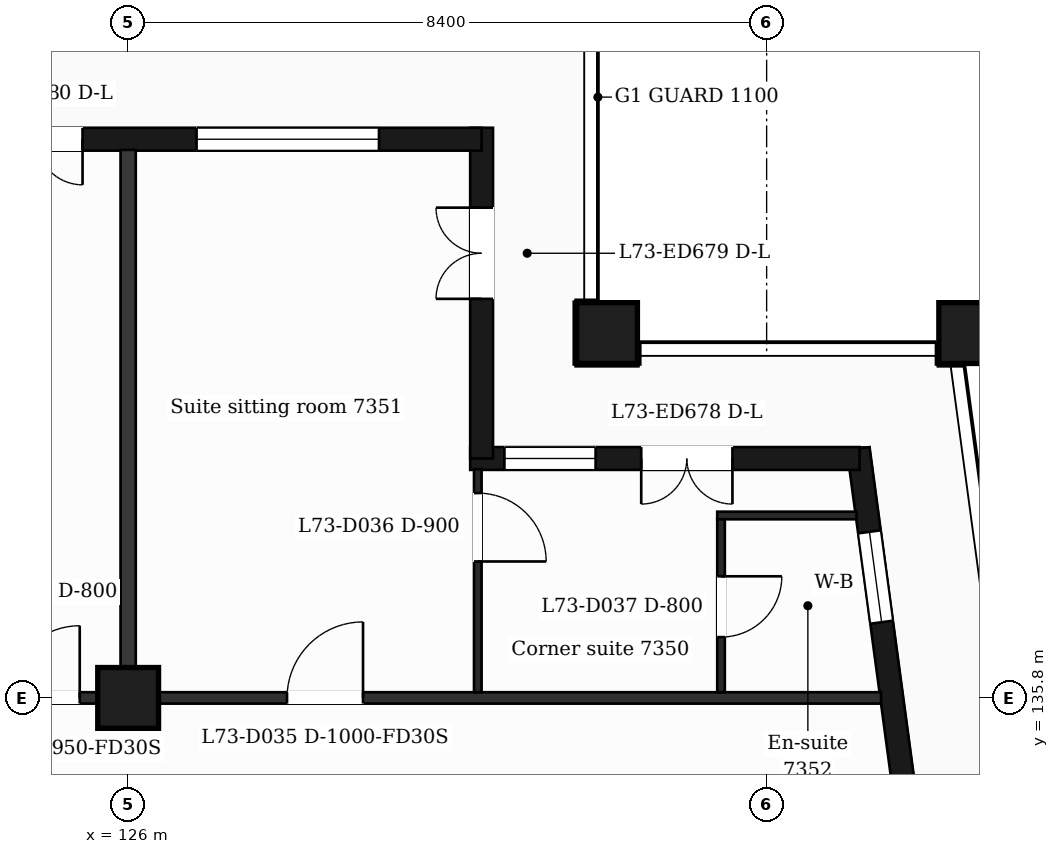
"""IFC4 building model, lengths in metres.
Left out: names, types, materials, properties, quantities, classifications, styles, units other than length and angle.
Written with IfcOpenShell. Run it as: python <this file> out.ifc"""

import sys

from ifc_helpers import new_model, si_unit, direction, frame, frame_2d, origin, origin_2d, place, context, subcontext, project, spatial, rectangle, extrude, element, fill, save


model = new_model("IFC4")
c1 = context("Model", 3, precision=1e-05, world=origin(), true_north=direction((0.0, 1.0)))
c2 = subcontext(c1, "Body", "Model", "MODEL_VIEW")
j1 = project(units=[si_unit("LENGTHUNIT", "METRE"), si_unit("PLANEANGLEUNIT", "RADIAN")], contexts=[c1])
p1 = place(None, origin())
s1 = spatial("IfcSite", under=j1, at=p1, CompositionType="ELEMENT")
p2 = place(p1, origin())
s2 = spatial("IfcBuilding", under=s1, at=p2, CompositionType="ELEMENT")
p3 = place(p2, frame((0.0, 0.0, 299.7)))
s3 = spatial("IfcBuildingStorey", under=s2, at=p3, CompositionType="ELEMENT", Elevation=299.7)
for number, where, z_axis, x_axis in (
    (1, (132.3, 140.6, 0.0), (0.0, 0.0, 1.0), (1.0, 0.0, 0.0)),
    (2, (137.065, 140.6, 0.0), (0.0, 0.0, 1.0), (1.0, 0.0, 0.0)),
    (3, (126.0, 135.8, 0.0), (0.0, 0.0, 1.0), (1.0, 0.0, 0.0)),
):
    element("IfcColumn", number, at=place(p3, frame(where, z_axis=z_axis, x_axis=x_axis)), inside=s3, PredefinedType="COLUMN", context=c2, shape_type="SweptSolid", body=[
        extrude(rectangle(XDim=0.8, YDim=0.8, at=origin_2d()), origin(), (0.0, 0.0, 1.0), 3.7),
    ])
p4 = place(p3, frame((136.504, 132.4, 0.0), z_axis=(0.0, 0.0, 1.0), x_axis=(-0.133399697462, 0.99106231929, 0.0)))
e4 = element("IfcWall", 4, at=p4, inside=s3, PredefinedType="SOLIDWALL", context=c2, shape_type="SweptSolid", body=[
    extrude(rectangle(XDim=6.74, YDim=0.3, at=frame_2d((3.37, 0.0))), origin(), (0.0, 0.0, 1.0), 3.25),
])
p5 = place(p4, frame((1.115, 0.0, 0.0)))
e5 = element("IfcOpeningElement", 5, at=p5, cuts=e4, PredefinedType="OPENING", context=c2, shape_type="SweptSolid", body=[
    extrude(rectangle(XDim=1.2, YDim=2.4, at=frame_2d((0.6, 1.2))), frame((0.0, 0.16, 0.0), z_axis=(0.0, -1.0, 0.0), x_axis=(1.0, 0.0, 0.0)), (0.0, 0.0, 1.0), 0.32),
])
p6 = place(p4, frame((4.436, 0.0, 0.9)))
e6 = element("IfcOpeningElement", 6, at=p6, cuts=e4, PredefinedType="OPENING", context=c2, shape_type="SweptSolid", body=[
    extrude(rectangle(XDim=1.2, YDim=2.1, at=frame_2d((0.6, 1.05))), frame((0.0, 0.16, 0.0), z_axis=(0.0, -1.0, 0.0), x_axis=(1.0, 0.0, 0.0)), (0.0, 0.0, 1.0), 0.32),
])
p7 = place(p3, frame((135.623, 138.95, 0.0), z_axis=(0.0, 0.0, 1.0), x_axis=(-1.0, 0.0, 0.0)))
e7 = element("IfcWall", 7, at=p7, inside=s3, PredefinedType="SOLIDWALL", context=c2, shape_type="SweptSolid", body=[
    extrude(rectangle(XDim=5.123, YDim=0.3, at=frame_2d((2.561, 0.0))), origin(), (0.0, 0.0, 1.0), 3.25),
])
p8 = place(p7, frame((1.673, 0.0, 0.0)))
e8 = element("IfcOpeningElement", 8, at=p8, cuts=e7, PredefinedType="OPENING", context=c2, shape_type="SweptSolid", body=[
    extrude(rectangle(XDim=1.2, YDim=2.4, at=frame_2d((0.6, 1.2))), frame((0.0, 0.16, 0.0), z_axis=(0.0, -1.0, 0.0), x_axis=(1.0, 0.0, 0.0)), (0.0, 0.0, 1.0), 0.32),
])
p9 = place(p7, frame((3.473, 0.0, 0.9)))
e9 = element("IfcOpeningElement", 9, at=p9, cuts=e7, PredefinedType="OPENING", context=c2, shape_type="SweptSolid", body=[
    extrude(rectangle(XDim=1.2, YDim=2.1, at=frame_2d((0.6, 1.05))), frame((0.0, 0.16, 0.0), z_axis=(0.0, -1.0, 0.0), x_axis=(1.0, 0.0, 0.0)), (0.0, 0.0, 1.0), 0.32),
])
p10 = place(p3, frame((130.65, 138.95, 0.0), z_axis=(0.0, 0.0, 1.0), x_axis=(0.0, 1.0, 0.0)))
e10 = element("IfcWall", 10, at=p10, inside=s3, PredefinedType="SOLIDWALL", context=c2, shape_type="SweptSolid", body=[
    extrude(rectangle(XDim=4.35, YDim=0.3, at=frame_2d((2.175, 0.0))), origin(), (0.0, 0.0, 1.0), 3.25),
])
p11 = place(p10, frame((2.1, 0.0, 0.0)))
e11 = element("IfcOpeningElement", 11, at=p11, cuts=e10, PredefinedType="OPENING", context=c2, shape_type="SweptSolid", body=[
    extrude(rectangle(XDim=1.2, YDim=2.4, at=frame_2d((0.6, 1.2))), frame((0.0, 0.16, 0.0), z_axis=(0.0, -1.0, 0.0), x_axis=(1.0, 0.0, 0.0)), (0.0, 0.0, 1.0), 0.32),
])
p12 = place(p3, frame((130.65, 143.15, 0.0), z_axis=(0.0, 0.0, 1.0), x_axis=(-1.0, 0.0, 0.0)))
e12 = element("IfcWall", 12, at=p12, inside=s3, PredefinedType="SOLIDWALL", context=c2, shape_type="SweptSolid", body=[
    extrude(rectangle(XDim=14.25, YDim=0.3, at=frame_2d((7.125, 0.0))), origin(), (0.0, 0.0, 1.0), 3.25),
])
p13 = place(p12, frame((1.35, 0.0, 0.9)))
e13 = element("IfcOpeningElement", 13, at=p13, cuts=e12, PredefinedType="OPENING", context=c2, shape_type="SweptSolid", body=[
    extrude(rectangle(XDim=2.4, YDim=2.1, at=frame_2d((1.2, 1.05))), frame((0.0, 0.16, 0.0), z_axis=(0.0, -1.0, 0.0), x_axis=(1.0, 0.0, 0.0)), (0.0, 0.0, 1.0), 0.32),
])
p14 = place(p12, frame((5.25, 0.0, 0.0)))
e14 = element("IfcOpeningElement", 14, at=p14, cuts=e12, PredefinedType="OPENING", context=c2, shape_type="SweptSolid", body=[
    extrude(rectangle(XDim=1.2, YDim=2.4, at=frame_2d((0.6, 1.2))), frame((0.0, 0.16, 0.0), z_axis=(0.0, -1.0, 0.0), x_axis=(1.0, 0.0, 0.0)), (0.0, 0.0, 1.0), 0.32),
])
p15 = place(p12, frame((7.05, 0.0, 0.9)))
e15 = element("IfcOpeningElement", 15, at=p15, cuts=e12, PredefinedType="OPENING", context=c2, shape_type="SweptSolid", body=[
    extrude(rectangle(XDim=1.2, YDim=2.1, at=frame_2d((0.6, 1.05))), frame((0.0, 0.16, 0.0), z_axis=(0.0, -1.0, 0.0), x_axis=(1.0, 0.0, 0.0)), (0.0, 0.0, 1.0), 0.32),
])
p16 = place(p12, frame((10.35, 0.0, 0.9)))
e16 = element("IfcOpeningElement", 16, at=p16, cuts=e12, PredefinedType="OPENING", context=c2, shape_type="SweptSolid", body=[
    extrude(rectangle(XDim=1.2, YDim=2.1, at=frame_2d((0.6, 1.05))), frame((0.0, 0.16, 0.0), z_axis=(0.0, -1.0, 0.0), x_axis=(1.0, 0.0, 0.0)), (0.0, 0.0, 1.0), 0.32),
])
p17 = place(p3, frame((90.895, 135.8, 0.0), z_axis=(0.0, 0.0, 1.0), x_axis=(1.0, 0.0, 0.0)))
e17 = element("IfcWall", 17, at=p17, inside=s3, PredefinedType="PARTITIONING", context=c2, shape_type="SweptSolid", body=[
    extrude(rectangle(XDim=45.011, YDim=0.15, at=frame_2d((22.505, 0.0))), origin(), (0.0, 0.0, 1.0), 3.25),
])
p18 = place(p17, frame((6.906, 0.0, 0.0)))
e18 = element("IfcOpeningElement", 18, at=p18, cuts=e17, PredefinedType="OPENING", context=c2, shape_type="SweptSolid", body=[
    extrude(rectangle(XDim=1.0, YDim=2.1, at=frame_2d((0.5, 1.05))), frame((0.0, 0.085, 0.0), z_axis=(0.0, -1.0, 0.0), x_axis=(1.0, 0.0, 0.0)), (0.0, 0.0, 1.0), 0.17),
])
p19 = place(p17, frame((10.555, 0.0, 0.0)))
e19 = element("IfcOpeningElement", 19, at=p19, cuts=e17, PredefinedType="OPENING", context=c2, shape_type="SweptSolid", body=[
    extrude(rectangle(XDim=1.0, YDim=2.1, at=frame_2d((0.5, 1.05))), frame((0.0, 0.085, 0.0), z_axis=(0.0, -1.0, 0.0), x_axis=(1.0, 0.0, 0.0)), (0.0, 0.0, 1.0), 0.17),
])
p20 = place(p17, frame((16.719, 0.0, 0.0)))
e20 = element("IfcOpeningElement", 20, at=p20, cuts=e17, PredefinedType="OPENING", context=c2, shape_type="SweptSolid", body=[
    extrude(rectangle(XDim=0.95, YDim=2.1, at=frame_2d((0.475, 1.05))), frame((0.0, 0.085, 0.0), z_axis=(0.0, -1.0, 0.0), x_axis=(1.0, 0.0, 0.0)), (0.0, 0.0, 1.0), 0.17),
])
p21 = place(p17, frame((21.281, 0.0, 0.0)))
e21 = element("IfcOpeningElement", 21, at=p21, cuts=e17, PredefinedType="OPENING", context=c2, shape_type="SweptSolid", body=[
    extrude(rectangle(XDim=0.95, YDim=2.1, at=frame_2d((0.475, 1.05))), frame((0.0, 0.085, 0.0), z_axis=(0.0, -1.0, 0.0), x_axis=(1.0, 0.0, 0.0)), (0.0, 0.0, 1.0), 0.17),
])
p22 = place(p17, frame((25.125, 0.0, 0.0)))
e22 = element("IfcOpeningElement", 22, at=p22, cuts=e17, PredefinedType="OPENING", context=c2, shape_type="SweptSolid", body=[
    extrude(rectangle(XDim=0.95, YDim=2.1, at=frame_2d((0.475, 1.05))), frame((0.0, 0.085, 0.0), z_axis=(0.0, -1.0, 0.0), x_axis=(1.0, 0.0, 0.0)), (0.0, 0.0, 1.0), 0.17),
])
p23 = place(p17, frame((27.393, 0.0, 0.0)))
e23 = element("IfcOpeningElement", 23, at=p23, cuts=e17, PredefinedType="OPENING", context=c2, shape_type="SweptSolid", body=[
    extrude(rectangle(XDim=0.95, YDim=2.1, at=frame_2d((0.475, 1.05))), frame((0.0, 0.085, 0.0), z_axis=(0.0, -1.0, 0.0), x_axis=(1.0, 0.0, 0.0)), (0.0, 0.0, 1.0), 0.17),
])
p24 = place(p17, frame((33.518, 0.0, 0.0)))
e24 = element("IfcOpeningElement", 24, at=p24, cuts=e17, PredefinedType="OPENING", context=c2, shape_type="SweptSolid", body=[
    extrude(rectangle(XDim=0.95, YDim=2.1, at=frame_2d((0.475, 1.05))), frame((0.0, 0.085, 0.0), z_axis=(0.0, -1.0, 0.0), x_axis=(1.0, 0.0, 0.0)), (0.0, 0.0, 1.0), 0.17),
])
p25 = place(p17, frame((37.195, 0.0, 0.0)))
e25 = element("IfcOpeningElement", 25, at=p25, cuts=e17, PredefinedType="OPENING", context=c2, shape_type="SweptSolid", body=[
    extrude(rectangle(XDim=1.0, YDim=2.1, at=frame_2d((0.5, 1.05))), frame((0.0, 0.085, 0.0), z_axis=(0.0, -1.0, 0.0), x_axis=(1.0, 0.0, 0.0)), (0.0, 0.0, 1.0), 0.17),
])
p26 = place(p3, frame((133.75, 138.2, 0.0), z_axis=(0.0, 0.0, 1.0), x_axis=(1.0, 0.0, 0.0)))
e26 = element("IfcWall", 26, at=p26, inside=s3, PredefinedType="PARTITIONING", context=c2, shape_type="SweptSolid", body=[
    extrude(rectangle(XDim=1.832, YDim=0.1, at=frame_2d((0.916, 0.0))), origin(), (0.0, 0.0, 1.0), 3.25),
])
p27 = place(p3, frame((126.0, 135.875, 0.0), z_axis=(0.0, 0.0, 1.0), x_axis=(0.0, 1.0, 0.0)))
e27 = element("IfcWall", 27, at=p27, inside=s3, PredefinedType="PARTITIONING", context=c2, shape_type="SweptSolid", body=[
    extrude(rectangle(XDim=7.135, YDim=0.2, at=frame_2d((3.567, 0.0))), origin(), (0.0, 0.0, 1.0), 3.25),
])
p28 = place(p3, frame((130.6, 135.875, 0.0), z_axis=(0.0, 0.0, 1.0), x_axis=(0.0, 1.0, 0.0)))
e28 = element("IfcWall", 28, at=p28, inside=s3, PredefinedType="PARTITIONING", context=c2, shape_type="SweptSolid", body=[
    extrude(rectangle(XDim=2.935, YDim=0.1, at=frame_2d((1.468, 0.0))), origin(), (0.0, 0.0, 1.0), 3.25),
])
p29 = place(p28, frame((1.72, 0.0, 0.0)))
e29 = element("IfcOpeningElement", 29, at=p29, cuts=e28, PredefinedType="OPENING", context=c2, shape_type="SweptSolid", body=[
    extrude(rectangle(XDim=0.9, YDim=2.1, at=frame_2d((0.45, 1.05))), frame((0.0, 0.06, 0.0), z_axis=(0.0, -1.0, 0.0), x_axis=(1.0, 0.0, 0.0)), (0.0, 0.0, 1.0), 0.12),
])
p30 = place(p3, frame((133.8, 135.875, 0.0), z_axis=(0.0, 0.0, 1.0), x_axis=(0.0, 1.0, 0.0)))
e30 = element("IfcWall", 30, at=p30, inside=s3, PredefinedType="PARTITIONING", context=c2, shape_type="SweptSolid", body=[
    extrude(rectangle(XDim=2.275, YDim=0.1, at=frame_2d((1.137, 0.0))), origin(), (0.0, 0.0, 1.0), 3.25),
])
p31 = place(p30, frame((0.725, 0.0, 0.0)))
e31 = element("IfcOpeningElement", 31, at=p31, cuts=e30, PredefinedType="OPENING", context=c2, shape_type="SweptSolid", body=[
    extrude(rectangle(XDim=0.8, YDim=2.1, at=frame_2d((0.4, 1.05))), frame((0.0, 0.06, 0.0), z_axis=(0.0, -1.0, 0.0), x_axis=(1.0, 0.0, 0.0)), (0.0, 0.0, 1.0), 0.12),
])
p32 = place(p6, origin())
e32 = element("IfcWindow", 32, at=p32, inside=s3, PartitioningType="SINGLE_PANEL", PredefinedType="WINDOW", context=c2, shape_type="SweptSolid", body=[
    extrude(rectangle(XDim=1.2, YDim=2.1, at=frame_2d((0.6, 1.05))), frame((0.0, 0.03, 0.0), z_axis=(0.0, -1.0, 0.0), x_axis=(1.0, 0.0, 0.0)), (0.0, 0.0, 1.0), 0.06),
])
fill(e6, e32)
p33 = place(p8, origin())
e33 = element("IfcDoor", 33, at=p33, inside=s3, OperationType="DOUBLE_DOOR_SINGLE_SWING", PredefinedType="DOOR", context=c2, shape_type="SweptSolid", body=[
    extrude(rectangle(XDim=1.2, YDim=2.4, at=frame_2d((0.6, 1.2))), frame((0.0, 0.025, 0.0), z_axis=(0.0, -1.0, 0.0), x_axis=(1.0, 0.0, 0.0)), (0.0, 0.0, 1.0), 0.05),
])
fill(e8, e33)
p34 = place(p9, origin())
e34 = element("IfcWindow", 34, at=p34, inside=s3, PartitioningType="SINGLE_PANEL", PredefinedType="WINDOW", context=c2, shape_type="SweptSolid", body=[
    extrude(rectangle(XDim=1.2, YDim=2.1, at=frame_2d((0.6, 1.05))), frame((0.0, 0.03, 0.0), z_axis=(0.0, -1.0, 0.0), x_axis=(1.0, 0.0, 0.0)), (0.0, 0.0, 1.0), 0.06),
])
fill(e9, e34)
p35 = place(p11, origin())
e35 = element("IfcDoor", 35, at=p35, inside=s3, OperationType="DOUBLE_DOOR_SINGLE_SWING", PredefinedType="DOOR", context=c2, shape_type="SweptSolid", body=[
    extrude(rectangle(XDim=1.2, YDim=2.4, at=frame_2d((0.6, 1.2))), frame((0.0, 0.025, 0.0), z_axis=(0.0, -1.0, 0.0), x_axis=(1.0, 0.0, 0.0)), (0.0, 0.0, 1.0), 0.05),
])
fill(e11, e35)
p36 = place(p13, origin())
e36 = element("IfcWindow", 36, at=p36, inside=s3, PartitioningType="SINGLE_PANEL", PredefinedType="WINDOW", context=c2, shape_type="SweptSolid", body=[
    extrude(rectangle(XDim=2.4, YDim=2.1, at=frame_2d((1.2, 1.05))), frame((0.0, 0.03, 0.0), z_axis=(0.0, -1.0, 0.0), x_axis=(1.0, 0.0, 0.0)), (0.0, 0.0, 1.0), 0.06),
])
fill(e13, e36)
p37 = place(p14, origin())
e37 = element("IfcDoor", 37, at=p37, inside=s3, OperationType="DOUBLE_DOOR_SINGLE_SWING", PredefinedType="DOOR", context=c2, shape_type="SweptSolid", body=[
    extrude(rectangle(XDim=1.2, YDim=2.4, at=frame_2d((0.6, 1.2))), frame((0.0, 0.025, 0.0), z_axis=(0.0, -1.0, 0.0), x_axis=(1.0, 0.0, 0.0)), (0.0, 0.0, 1.0), 0.05),
])
fill(e14, e37)
p38 = place(p24, origin())
e38 = element("IfcDoor", 38, at=p38, inside=s3, OperationType="SINGLE_SWING_RIGHT", PredefinedType="DOOR", context=c2, shape_type="SweptSolid", body=[
    extrude(rectangle(XDim=0.95, YDim=2.1, at=frame_2d((0.475, 1.05))), frame((0.0, 0.025, 0.0), z_axis=(0.0, -1.0, 0.0), x_axis=(1.0, 0.0, 0.0)), (0.0, 0.0, 1.0), 0.05),
])
fill(e24, e38)
p39 = place(p25, origin())
e39 = element("IfcDoor", 39, at=p39, inside=s3, OperationType="SINGLE_SWING_RIGHT", PredefinedType="DOOR", context=c2, shape_type="SweptSolid", body=[
    extrude(rectangle(XDim=1.0, YDim=2.1, at=frame_2d((0.5, 1.05))), frame((0.0, 0.025, 0.0), z_axis=(0.0, -1.0, 0.0), x_axis=(1.0, 0.0, 0.0)), (0.0, 0.0, 1.0), 0.05),
])
fill(e25, e39)
p40 = place(p29, origin())
e40 = element("IfcDoor", 40, at=p40, inside=s3, OperationType="SINGLE_SWING_LEFT", PredefinedType="DOOR", context=c2, shape_type="SweptSolid", body=[
    extrude(rectangle(XDim=0.9, YDim=2.1, at=frame_2d((0.45, 1.05))), frame((0.0, 0.025, 0.0), z_axis=(0.0, -1.0, 0.0), x_axis=(1.0, 0.0, 0.0)), (0.0, 0.0, 1.0), 0.05),
])
fill(e29, e40)
p41 = place(p31, origin())
e41 = element("IfcDoor", 41, at=p41, inside=s3, OperationType="SINGLE_SWING_RIGHT", PredefinedType="DOOR", context=c2, shape_type="SweptSolid", body=[
    extrude(rectangle(XDim=0.8, YDim=2.1, at=frame_2d((0.4, 1.05))), frame((0.0, 0.025, 0.0), z_axis=(0.0, -1.0, 0.0), x_axis=(1.0, 0.0, 0.0)), (0.0, 0.0, 1.0), 0.05),
])
fill(e31, e41)
save(model, sys.argv[1])
